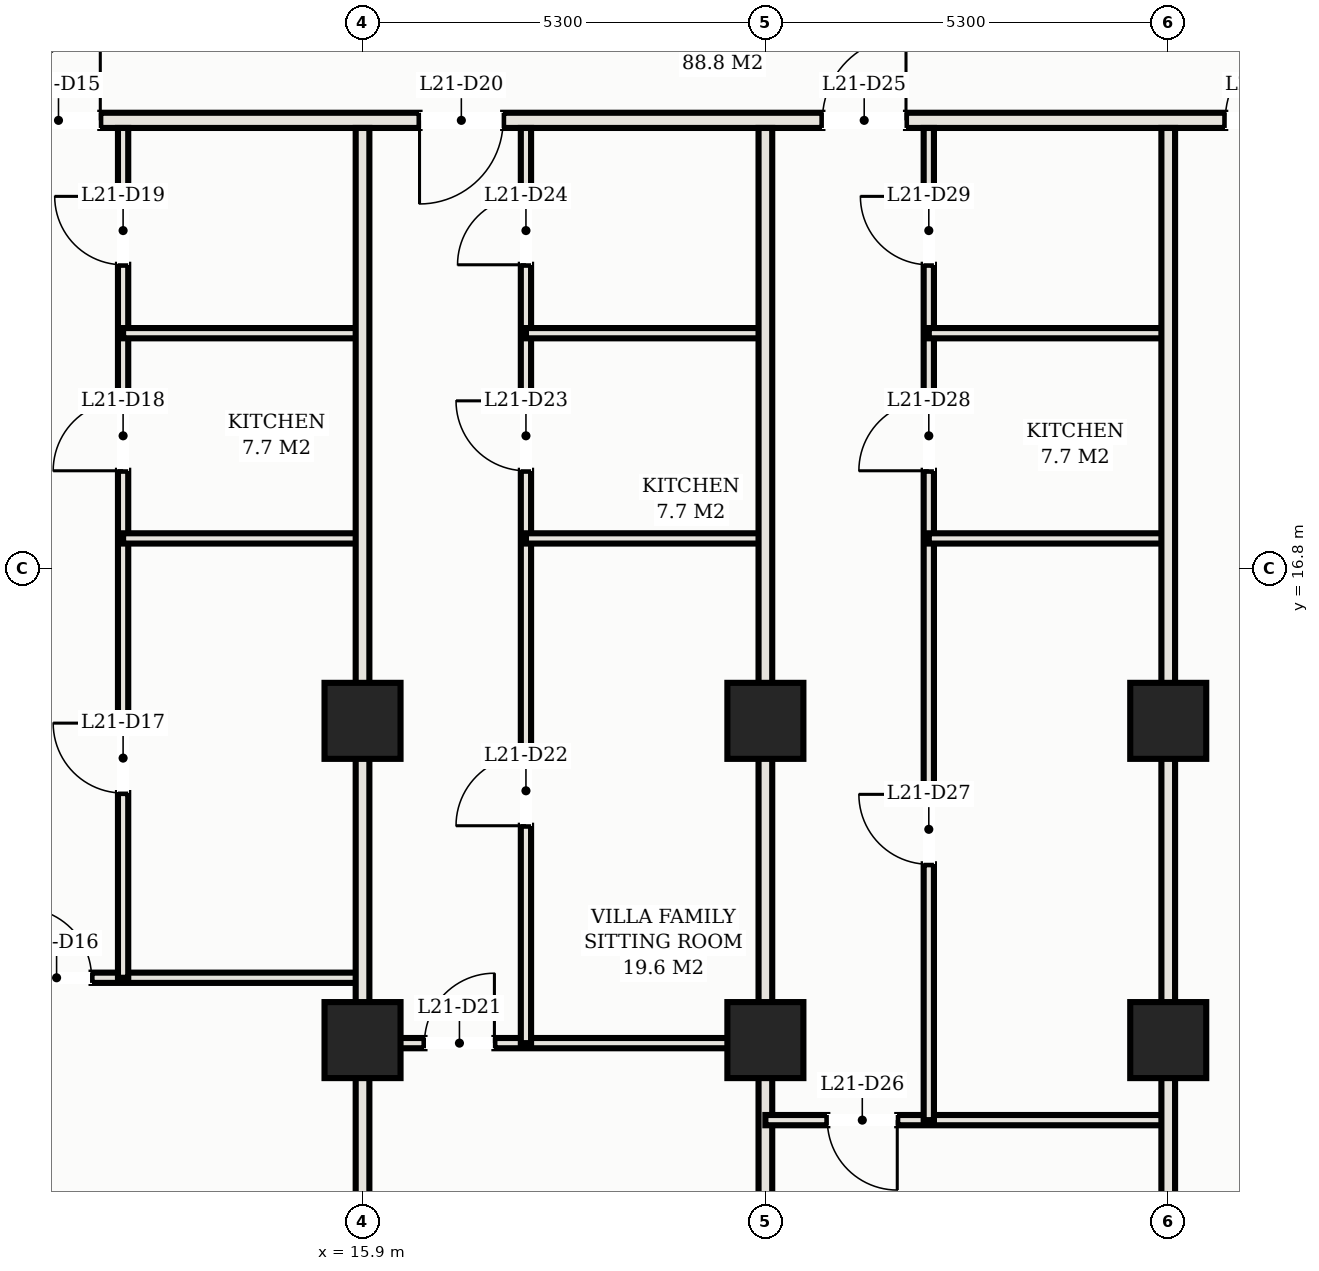
"""IFC4 building model, lengths in metres.
Left out: names, types, materials, properties, quantities, classifications, styles, units other than length and angle.
Written with IfcOpenShell. Run it as: python <this file> out.ifc"""

import sys

from ifc_helpers import new_model, si_unit, direction, frame, frame_2d, origin, origin_2d, place, context, subcontext, project, spatial, rectangle, hollow_rectangle, extrude, element, fill, save


model = new_model("IFC4")
c1 = context("Model", 3, precision=1e-05, world=origin(), true_north=direction((0.0, 1.0)))
c2 = subcontext(c1, "Body", "Model", "MODEL_VIEW")
j1 = project(units=[si_unit("LENGTHUNIT", "METRE"), si_unit("PLANEANGLEUNIT", "RADIAN")], contexts=[c1])
p1 = place(None, origin())
s1 = spatial("IfcSite", under=j1, at=p1, CompositionType="ELEMENT")
p2 = place(p1, origin())
s2 = spatial("IfcBuilding", under=s1, at=p2, CompositionType="ELEMENT")
p3 = place(p2, frame((0.0, 0.0, 81.7)))
s3 = spatial("IfcBuildingStorey", under=s2, at=p3, CompositionType="ELEMENT", Elevation=81.7)
for number, where, z_axis, x_axis in (
    (1, (15.9, 14.8, 0.0), (0.0, 0.0, 1.0), (1.0, 0.0, 0.0)),
    (2, (15.9, 10.6, 0.0), (0.0, 0.0, 1.0), (1.0, 0.0, 0.0)),
    (3, (21.2, 14.8, 0.0), (0.0, 0.0, 1.0), (1.0, 0.0, 0.0)),
    (4, (21.2, 10.6, 0.0), (0.0, 0.0, 1.0), (1.0, 0.0, 0.0)),
    (5, (26.5, 14.8, 0.0), (0.0, 0.0, 1.0), (1.0, 0.0, 0.0)),
    (6, (26.5, 10.6, 0.0), (0.0, 0.0, 1.0), (1.0, 0.0, 0.0)),
):
    element("IfcColumn", number, at=place(p3, frame(where, z_axis=z_axis, x_axis=x_axis)), inside=s3, PredefinedType="COLUMN", context=c2, shape_type="SweptSolid", body=[
        extrude(hollow_rectangle(XDim=1.0, YDim=1.0, WallThickness=0.036, at=origin_2d()), origin(), (0.0, 0.0, 1.0), 3.3),
    ])
p4 = place(p3, frame((1.62, 22.7, 0.0), z_axis=(0.0, 0.0, 1.0), x_axis=(1.0, 0.0, 0.0)))
e7 = element("IfcWall", 7, at=p4, inside=s3, PredefinedType="PARTITIONING", context=c2, shape_type="SweptSolid", body=[
    extrude(rectangle(XDim=49.76, YDim=0.2, at=frame_2d((24.88, 0.0))), origin(), (0.0, 0.0, 1.0), 2.38),
])
p5 = place(p4, frame((9.73, 0.0, 0.0)))
e8 = element("IfcOpeningElement", 8, at=p5, cuts=e7, PredefinedType="OPENING", context=c2, shape_type="SweptSolid", body=[
    extrude(rectangle(XDim=1.1, YDim=2.25, at=frame_2d((0.55, 1.125))), frame((0.0, 0.11, 0.0), z_axis=(0.0, -1.0, 0.0), x_axis=(1.0, 0.0, 0.0)), (0.0, 0.0, 1.0), 0.22),
])
p6 = place(p4, frame((15.03, 0.0, 0.0)))
e9 = element("IfcOpeningElement", 9, at=p6, cuts=e7, PredefinedType="OPENING", context=c2, shape_type="SweptSolid", body=[
    extrude(rectangle(XDim=1.1, YDim=2.25, at=frame_2d((0.55, 1.125))), frame((0.0, 0.11, 0.0), z_axis=(0.0, -1.0, 0.0), x_axis=(1.0, 0.0, 0.0)), (0.0, 0.0, 1.0), 0.22),
])
p7 = place(p4, frame((20.33, 0.0, 0.0)))
e10 = element("IfcOpeningElement", 10, at=p7, cuts=e7, PredefinedType="OPENING", context=c2, shape_type="SweptSolid", body=[
    extrude(rectangle(XDim=1.1, YDim=2.25, at=frame_2d((0.55, 1.125))), frame((0.0, 0.11, 0.0), z_axis=(0.0, -1.0, 0.0), x_axis=(1.0, 0.0, 0.0)), (0.0, 0.0, 1.0), 0.22),
])
p8 = place(p4, frame((25.63, 0.0, 0.0)))
e11 = element("IfcOpeningElement", 11, at=p8, cuts=e7, PredefinedType="OPENING", context=c2, shape_type="SweptSolid", body=[
    extrude(rectangle(XDim=1.1, YDim=2.25, at=frame_2d((0.55, 1.125))), frame((0.0, 0.11, 0.0), z_axis=(0.0, -1.0, 0.0), x_axis=(1.0, 0.0, 0.0)), (0.0, 0.0, 1.0), 0.22),
])
p9 = place(p4, frame((33.33, 0.0, 0.0)))
e12 = element("IfcOpeningElement", 12, at=p9, cuts=e7, PredefinedType="OPENING", context=c2, shape_type="SweptSolid", body=[
    extrude(rectangle(XDim=1.1, YDim=2.25, at=frame_2d((0.55, 1.125))), frame((0.0, 0.11, 0.0), z_axis=(0.0, -1.0, 0.0), x_axis=(1.0, 0.0, 0.0)), (0.0, 0.0, 1.0), 0.22),
])
p10 = place(p4, frame((3.985, 0.0, 0.0)))
e13 = element("IfcOpeningElement", 13, at=p10, cuts=e7, PredefinedType="OPENING", context=c2, shape_type="SweptSolid", body=[
    extrude(rectangle(XDim=0.92, YDim=2.15, at=frame_2d((0.46, 1.075))), frame((0.0, 0.11, 0.0), z_axis=(0.0, -1.0, 0.0), x_axis=(1.0, 0.0, 0.0)), (0.0, 0.0, 1.0), 0.22),
])
p11 = place(p4, frame((44.855, 0.0, 0.0)))
e14 = element("IfcOpeningElement", 14, at=p11, cuts=e7, PredefinedType="OPENING", context=c2, shape_type="SweptSolid", body=[
    extrude(rectangle(XDim=0.92, YDim=2.15, at=frame_2d((0.46, 1.075))), frame((0.0, 0.11, 0.0), z_axis=(0.0, -1.0, 0.0), x_axis=(1.0, 0.0, 0.0)), (0.0, 0.0, 1.0), 0.22),
])
p12 = place(p3, frame((10.6, 11.42, 0.0), z_axis=(0.0, 0.0, 1.0), x_axis=(1.0, 0.0, 0.0)))
e15 = element("IfcWall", 15, at=p12, inside=s3, PredefinedType="PARTITIONING", context=c2, shape_type="SweptSolid", body=[
    extrude(rectangle(XDim=5.3, YDim=0.135, at=frame_2d((2.65, 0.0))), origin(), (0.0, 0.0, 1.0), 2.38),
])
p13 = place(p12, frame((0.815, 0.0, 0.0)))
e16 = element("IfcOpeningElement", 16, at=p13, cuts=e15, PredefinedType="OPENING", context=c2, shape_type="SweptSolid", body=[
    extrude(rectangle(XDim=0.92, YDim=2.15, at=frame_2d((0.46, 1.075))), frame((0.0, 0.078, 0.0), z_axis=(0.0, -1.0, 0.0), x_axis=(1.0, 0.0, 0.0)), (0.0, 0.0, 1.0), 0.155),
])
p14 = place(p3, frame((12.75, 11.42, 0.0), z_axis=(0.0, 0.0, 1.0), x_axis=(0.0, 1.0, 0.0)))
e17 = element("IfcWall", 17, at=p14, inside=s3, PredefinedType="PARTITIONING", context=c2, shape_type="SweptSolid", body=[
    extrude(rectangle(XDim=11.18, YDim=0.135, at=frame_2d((5.59, 0.0))), origin(), (0.0, 0.0, 1.0), 2.38),
])
p15 = place(p14, frame((2.43, 0.0, 0.0)))
e18 = element("IfcOpeningElement", 18, at=p15, cuts=e17, PredefinedType="OPENING", context=c2, shape_type="SweptSolid", body=[
    extrude(rectangle(XDim=0.92, YDim=2.15, at=frame_2d((0.46, 1.075))), frame((0.0, 0.078, 0.0), z_axis=(0.0, -1.0, 0.0), x_axis=(1.0, 0.0, 0.0)), (0.0, 0.0, 1.0), 0.155),
])
p16 = place(p14, frame((6.67, 0.0, 0.0)))
e19 = element("IfcOpeningElement", 19, at=p16, cuts=e17, PredefinedType="OPENING", context=c2, shape_type="SweptSolid", body=[
    extrude(rectangle(XDim=0.92, YDim=2.15, at=frame_2d((0.46, 1.075))), frame((0.0, 0.078, 0.0), z_axis=(0.0, -1.0, 0.0), x_axis=(1.0, 0.0, 0.0)), (0.0, 0.0, 1.0), 0.155),
])
p17 = place(p14, frame((9.38, 0.0, 0.0)))
e20 = element("IfcOpeningElement", 20, at=p17, cuts=e17, PredefinedType="OPENING", context=c2, shape_type="SweptSolid", body=[
    extrude(rectangle(XDim=0.9, YDim=2.15, at=frame_2d((0.45, 1.075))), frame((0.0, 0.078, 0.0), z_axis=(0.0, -1.0, 0.0), x_axis=(1.0, 0.0, 0.0)), (0.0, 0.0, 1.0), 0.155),
])
for number, where, z_axis, x_axis in (
    (21, (12.75, 17.2, 0.0), (0.0, 0.0, 1.0), (1.0, 0.0, 0.0)),
    (22, (12.75, 19.9, 0.0), (0.0, 0.0, 1.0), (1.0, 0.0, 0.0)),
):
    element("IfcWall", number, at=place(p3, frame(where, z_axis=z_axis, x_axis=x_axis)), inside=s3, PredefinedType="PARTITIONING", context=c2, shape_type="SweptSolid", body=[
        extrude(rectangle(XDim=3.15, YDim=0.135, at=frame_2d((1.575, 0.0))), origin(), (0.0, 0.0, 1.0), 2.38),
    ])
p18 = place(p3, frame((15.9, 1.62, 0.0), z_axis=(0.0, 0.0, 1.0), x_axis=(0.0, 1.0, 0.0)))
e23 = element("IfcWall", 23, at=p18, inside=s3, PredefinedType="PARTITIONING", context=c2, shape_type="SweptSolid", body=[
    extrude(rectangle(XDim=20.98, YDim=0.18, at=frame_2d((10.49, 0.0))), origin(), (0.0, 0.0, 1.0), 2.335),
])
p19 = place(p3, frame((15.9, 10.56, 0.0), z_axis=(0.0, 0.0, 1.0), x_axis=(1.0, 0.0, 0.0)))
e24 = element("IfcWall", 24, at=p19, inside=s3, PredefinedType="PARTITIONING", context=c2, shape_type="SweptSolid", body=[
    extrude(rectangle(XDim=5.3, YDim=0.135, at=frame_2d((2.65, 0.0))), origin(), (0.0, 0.0, 1.0), 2.335),
])
p20 = place(p19, frame((0.815, 0.0, 0.0)))
e25 = element("IfcOpeningElement", 25, at=p20, cuts=e24, PredefinedType="OPENING", context=c2, shape_type="SweptSolid", body=[
    extrude(rectangle(XDim=0.92, YDim=2.15, at=frame_2d((0.46, 1.075))), frame((0.0, 0.078, 0.0), z_axis=(0.0, -1.0, 0.0), x_axis=(1.0, 0.0, 0.0)), (0.0, 0.0, 1.0), 0.155),
])
p21 = place(p3, frame((18.05, 10.56, 0.0), z_axis=(0.0, 0.0, 1.0), x_axis=(0.0, 1.0, 0.0)))
e26 = element("IfcWall", 26, at=p21, inside=s3, PredefinedType="PARTITIONING", context=c2, shape_type="SweptSolid", body=[
    extrude(rectangle(XDim=12.04, YDim=0.135, at=frame_2d((6.02, 0.0))), origin(), (0.0, 0.0, 1.0), 2.38),
])
p22 = place(p21, frame((2.86, 0.0, 0.0)))
e27 = element("IfcOpeningElement", 27, at=p22, cuts=e26, PredefinedType="OPENING", context=c2, shape_type="SweptSolid", body=[
    extrude(rectangle(XDim=0.92, YDim=2.15, at=frame_2d((0.46, 1.075))), frame((0.0, 0.078, 0.0), z_axis=(0.0, -1.0, 0.0), x_axis=(1.0, 0.0, 0.0)), (0.0, 0.0, 1.0), 0.155),
])
p23 = place(p21, frame((7.53, 0.0, 0.0)))
e28 = element("IfcOpeningElement", 28, at=p23, cuts=e26, PredefinedType="OPENING", context=c2, shape_type="SweptSolid", body=[
    extrude(rectangle(XDim=0.92, YDim=2.15, at=frame_2d((0.46, 1.075))), frame((0.0, 0.078, 0.0), z_axis=(0.0, -1.0, 0.0), x_axis=(1.0, 0.0, 0.0)), (0.0, 0.0, 1.0), 0.155),
])
p24 = place(p21, frame((10.24, 0.0, 0.0)))
e29 = element("IfcOpeningElement", 29, at=p24, cuts=e26, PredefinedType="OPENING", context=c2, shape_type="SweptSolid", body=[
    extrude(rectangle(XDim=0.9, YDim=2.15, at=frame_2d((0.45, 1.075))), frame((0.0, 0.078, 0.0), z_axis=(0.0, -1.0, 0.0), x_axis=(1.0, 0.0, 0.0)), (0.0, 0.0, 1.0), 0.155),
])
for number, where, z_axis, x_axis in (
    (30, (18.05, 17.2, 0.0), (0.0, 0.0, 1.0), (1.0, 0.0, 0.0)),
    (31, (18.05, 19.9, 0.0), (0.0, 0.0, 1.0), (1.0, 0.0, 0.0)),
):
    element("IfcWall", number, at=place(p3, frame(where, z_axis=z_axis, x_axis=x_axis)), inside=s3, PredefinedType="PARTITIONING", context=c2, shape_type="SweptSolid", body=[
        extrude(rectangle(XDim=3.15, YDim=0.135, at=frame_2d((1.575, 0.0))), origin(), (0.0, 0.0, 1.0), 2.38),
    ])
p25 = place(p3, frame((21.2, 0.127, 0.0), z_axis=(0.0, 0.0, 1.0), x_axis=(0.0, 1.0, 0.0)))
e32 = element("IfcWall", 32, at=p25, inside=s3, PredefinedType="PARTITIONING", context=c2, shape_type="SweptSolid", body=[
    extrude(rectangle(XDim=22.473, YDim=0.18, at=frame_2d((11.237, 0.0))), origin(), (0.0, 0.0, 1.0), 2.335),
])
p26 = place(p3, frame((21.2, 9.547, 0.0), z_axis=(0.0, 0.0, 1.0), x_axis=(1.0, 0.0, 0.0)))
e33 = element("IfcWall", 33, at=p26, inside=s3, PredefinedType="PARTITIONING", context=c2, shape_type="SweptSolid", body=[
    extrude(rectangle(XDim=5.3, YDim=0.135, at=frame_2d((2.65, 0.0))), origin(), (0.0, 0.0, 1.0), 2.38),
])
p27 = place(p26, frame((0.815, 0.0, 0.0)))
e34 = element("IfcOpeningElement", 34, at=p27, cuts=e33, PredefinedType="OPENING", context=c2, shape_type="SweptSolid", body=[
    extrude(rectangle(XDim=0.92, YDim=2.15, at=frame_2d((0.46, 1.075))), frame((0.0, 0.078, 0.0), z_axis=(0.0, -1.0, 0.0), x_axis=(1.0, 0.0, 0.0)), (0.0, 0.0, 1.0), 0.155),
])
p28 = place(p3, frame((23.35, 9.547, 0.0), z_axis=(0.0, 0.0, 1.0), x_axis=(0.0, 1.0, 0.0)))
e35 = element("IfcWall", 35, at=p28, inside=s3, PredefinedType="PARTITIONING", context=c2, shape_type="SweptSolid", body=[
    extrude(rectangle(XDim=13.053, YDim=0.135, at=frame_2d((6.526, 0.0))), origin(), (0.0, 0.0, 1.0), 2.38),
])
p29 = place(p28, frame((3.366, 0.0, 0.0)))
e36 = element("IfcOpeningElement", 36, at=p29, cuts=e35, PredefinedType="OPENING", context=c2, shape_type="SweptSolid", body=[
    extrude(rectangle(XDim=0.92, YDim=2.15, at=frame_2d((0.46, 1.075))), frame((0.0, 0.078, 0.0), z_axis=(0.0, -1.0, 0.0), x_axis=(1.0, 0.0, 0.0)), (0.0, 0.0, 1.0), 0.155),
])
p30 = place(p28, frame((8.543, 0.0, 0.0)))
e37 = element("IfcOpeningElement", 37, at=p30, cuts=e35, PredefinedType="OPENING", context=c2, shape_type="SweptSolid", body=[
    extrude(rectangle(XDim=0.92, YDim=2.15, at=frame_2d((0.46, 1.075))), frame((0.0, 0.078, 0.0), z_axis=(0.0, -1.0, 0.0), x_axis=(1.0, 0.0, 0.0)), (0.0, 0.0, 1.0), 0.155),
])
p31 = place(p28, frame((11.253, 0.0, 0.0)))
e38 = element("IfcOpeningElement", 38, at=p31, cuts=e35, PredefinedType="OPENING", context=c2, shape_type="SweptSolid", body=[
    extrude(rectangle(XDim=0.9, YDim=2.15, at=frame_2d((0.45, 1.075))), frame((0.0, 0.078, 0.0), z_axis=(0.0, -1.0, 0.0), x_axis=(1.0, 0.0, 0.0)), (0.0, 0.0, 1.0), 0.155),
])
for number, where, z_axis, x_axis in (
    (39, (23.35, 17.2, 0.0), (0.0, 0.0, 1.0), (1.0, 0.0, 0.0)),
    (40, (23.35, 19.9, 0.0), (0.0, 0.0, 1.0), (1.0, 0.0, 0.0)),
):
    element("IfcWall", number, at=place(p3, frame(where, z_axis=z_axis, x_axis=x_axis)), inside=s3, PredefinedType="PARTITIONING", context=c2, shape_type="SweptSolid", body=[
        extrude(rectangle(XDim=3.15, YDim=0.135, at=frame_2d((1.575, 0.0))), origin(), (0.0, 0.0, 1.0), 2.38),
    ])
p32 = place(p3, frame((26.5, -0.38, 0.0), z_axis=(0.0, 0.0, 1.0), x_axis=(0.0, 1.0, 0.0)))
e41 = element("IfcWall", 41, at=p32, inside=s3, PredefinedType="PARTITIONING", context=c2, shape_type="SweptSolid", body=[
    extrude(rectangle(XDim=22.98, YDim=0.18, at=frame_2d((11.49, 0.0))), origin(), (0.0, 0.0, 1.0), 2.335),
])
p33 = place(p5, origin())
e42 = element("IfcDoor", 42, at=p33, inside=s3, OperationType="SINGLE_SWING_RIGHT", PredefinedType="DOOR", context=c2, shape_type="SweptSolid", body=[
    extrude(rectangle(XDim=1.1, YDim=2.25, at=frame_2d((0.55, 1.125))), frame((0.0, 0.025, 0.0), z_axis=(0.0, -1.0, 0.0), x_axis=(1.0, 0.0, 0.0)), (0.0, 0.0, 1.0), 0.05),
])
fill(e8, e42)
p34 = place(p13, origin())
e43 = element("IfcDoor", 43, at=p34, inside=s3, OperationType="SINGLE_SWING_LEFT", PredefinedType="DOOR", context=c2, shape_type="SweptSolid", body=[
    extrude(rectangle(XDim=0.92, YDim=2.15, at=frame_2d((0.46, 1.075))), frame((0.0, 0.025, 0.0), z_axis=(0.0, -1.0, 0.0), x_axis=(1.0, 0.0, 0.0)), (0.0, 0.0, 1.0), 0.05),
])
fill(e16, e43)
p35 = place(p15, origin())
e44 = element("IfcDoor", 44, at=p35, inside=s3, OperationType="SINGLE_SWING_RIGHT", PredefinedType="DOOR", context=c2, shape_type="SweptSolid", body=[
    extrude(rectangle(XDim=0.92, YDim=2.15, at=frame_2d((0.46, 1.075))), frame((0.0, 0.025, 0.0), z_axis=(0.0, -1.0, 0.0), x_axis=(1.0, 0.0, 0.0)), (0.0, 0.0, 1.0), 0.05),
])
fill(e18, e44)
p36 = place(p16, origin())
e45 = element("IfcDoor", 45, at=p36, inside=s3, OperationType="SINGLE_SWING_LEFT", PredefinedType="DOOR", context=c2, shape_type="SweptSolid", body=[
    extrude(rectangle(XDim=0.92, YDim=2.15, at=frame_2d((0.46, 1.075))), frame((0.0, 0.025, 0.0), z_axis=(0.0, -1.0, 0.0), x_axis=(1.0, 0.0, 0.0)), (0.0, 0.0, 1.0), 0.05),
])
fill(e19, e45)
p37 = place(p17, origin())
e46 = element("IfcDoor", 46, at=p37, inside=s3, OperationType="SINGLE_SWING_RIGHT", PredefinedType="DOOR", context=c2, shape_type="SweptSolid", body=[
    extrude(rectangle(XDim=0.9, YDim=2.15, at=frame_2d((0.45, 1.075))), frame((0.0, 0.025, 0.0), z_axis=(0.0, -1.0, 0.0), x_axis=(1.0, 0.0, 0.0)), (0.0, 0.0, 1.0), 0.05),
])
fill(e20, e46)
p38 = place(p6, frame((1.1, 0.0, 0.0), z_axis=(0.0, 0.0, 1.0), x_axis=(-1.0, 0.0, 0.0)))
e47 = element("IfcDoor", 47, at=p38, inside=s3, OperationType="SINGLE_SWING_RIGHT", PredefinedType="DOOR", context=c2, shape_type="SweptSolid", body=[
    extrude(rectangle(XDim=1.1, YDim=2.25, at=frame_2d((0.55, 1.125))), frame((0.0, 0.025, 0.0), z_axis=(0.0, -1.0, 0.0), x_axis=(1.0, 0.0, 0.0)), (0.0, 0.0, 1.0), 0.05),
])
fill(e9, e47)
p39 = place(p20, origin())
e48 = element("IfcDoor", 48, at=p39, inside=s3, OperationType="SINGLE_SWING_RIGHT", PredefinedType="DOOR", context=c2, shape_type="SweptSolid", body=[
    extrude(rectangle(XDim=0.92, YDim=2.15, at=frame_2d((0.46, 1.075))), frame((0.0, 0.025, 0.0), z_axis=(0.0, -1.0, 0.0), x_axis=(1.0, 0.0, 0.0)), (0.0, 0.0, 1.0), 0.05),
])
fill(e25, e48)
p40 = place(p22, origin())
e49 = element("IfcDoor", 49, at=p40, inside=s3, OperationType="SINGLE_SWING_LEFT", PredefinedType="DOOR", context=c2, shape_type="SweptSolid", body=[
    extrude(rectangle(XDim=0.92, YDim=2.15, at=frame_2d((0.46, 1.075))), frame((0.0, 0.025, 0.0), z_axis=(0.0, -1.0, 0.0), x_axis=(1.0, 0.0, 0.0)), (0.0, 0.0, 1.0), 0.05),
])
fill(e27, e49)
p41 = place(p23, origin())
e50 = element("IfcDoor", 50, at=p41, inside=s3, OperationType="SINGLE_SWING_RIGHT", PredefinedType="DOOR", context=c2, shape_type="SweptSolid", body=[
    extrude(rectangle(XDim=0.92, YDim=2.15, at=frame_2d((0.46, 1.075))), frame((0.0, 0.025, 0.0), z_axis=(0.0, -1.0, 0.0), x_axis=(1.0, 0.0, 0.0)), (0.0, 0.0, 1.0), 0.05),
])
fill(e28, e50)
p42 = place(p24, origin())
e51 = element("IfcDoor", 51, at=p42, inside=s3, OperationType="SINGLE_SWING_LEFT", PredefinedType="DOOR", context=c2, shape_type="SweptSolid", body=[
    extrude(rectangle(XDim=0.9, YDim=2.15, at=frame_2d((0.45, 1.075))), frame((0.0, 0.025, 0.0), z_axis=(0.0, -1.0, 0.0), x_axis=(1.0, 0.0, 0.0)), (0.0, 0.0, 1.0), 0.05),
])
fill(e29, e51)
p43 = place(p7, origin())
e52 = element("IfcDoor", 52, at=p43, inside=s3, OperationType="SINGLE_SWING_RIGHT", PredefinedType="DOOR", context=c2, shape_type="SweptSolid", body=[
    extrude(rectangle(XDim=1.1, YDim=2.25, at=frame_2d((0.55, 1.125))), frame((0.0, 0.025, 0.0), z_axis=(0.0, -1.0, 0.0), x_axis=(1.0, 0.0, 0.0)), (0.0, 0.0, 1.0), 0.05),
])
fill(e10, e52)
p44 = place(p27, frame((0.92, 0.0, 0.0), z_axis=(0.0, 0.0, 1.0), x_axis=(-1.0, 0.0, 0.0)))
e53 = element("IfcDoor", 53, at=p44, inside=s3, OperationType="SINGLE_SWING_LEFT", PredefinedType="DOOR", context=c2, shape_type="SweptSolid", body=[
    extrude(rectangle(XDim=0.92, YDim=2.15, at=frame_2d((0.46, 1.075))), frame((0.0, 0.025, 0.0), z_axis=(0.0, -1.0, 0.0), x_axis=(1.0, 0.0, 0.0)), (0.0, 0.0, 1.0), 0.05),
])
fill(e34, e53)
p45 = place(p29, origin())
e54 = element("IfcDoor", 54, at=p45, inside=s3, OperationType="SINGLE_SWING_RIGHT", PredefinedType="DOOR", context=c2, shape_type="SweptSolid", body=[
    extrude(rectangle(XDim=0.92, YDim=2.15, at=frame_2d((0.46, 1.075))), frame((0.0, 0.025, 0.0), z_axis=(0.0, -1.0, 0.0), x_axis=(1.0, 0.0, 0.0)), (0.0, 0.0, 1.0), 0.05),
])
fill(e36, e54)
p46 = place(p30, origin())
e55 = element("IfcDoor", 55, at=p46, inside=s3, OperationType="SINGLE_SWING_LEFT", PredefinedType="DOOR", context=c2, shape_type="SweptSolid", body=[
    extrude(rectangle(XDim=0.92, YDim=2.15, at=frame_2d((0.46, 1.075))), frame((0.0, 0.025, 0.0), z_axis=(0.0, -1.0, 0.0), x_axis=(1.0, 0.0, 0.0)), (0.0, 0.0, 1.0), 0.05),
])
fill(e37, e55)
p47 = place(p31, origin())
e56 = element("IfcDoor", 56, at=p47, inside=s3, OperationType="SINGLE_SWING_RIGHT", PredefinedType="DOOR", context=c2, shape_type="SweptSolid", body=[
    extrude(rectangle(XDim=0.9, YDim=2.15, at=frame_2d((0.45, 1.075))), frame((0.0, 0.025, 0.0), z_axis=(0.0, -1.0, 0.0), x_axis=(1.0, 0.0, 0.0)), (0.0, 0.0, 1.0), 0.05),
])
fill(e38, e56)
p48 = place(p8, origin())
e57 = element("IfcDoor", 57, at=p48, inside=s3, OperationType="SINGLE_SWING_RIGHT", PredefinedType="DOOR", context=c2, shape_type="SweptSolid", body=[
    extrude(rectangle(XDim=1.1, YDim=2.25, at=frame_2d((0.55, 1.125))), frame((0.0, 0.025, 0.0), z_axis=(0.0, -1.0, 0.0), x_axis=(1.0, 0.0, 0.0)), (0.0, 0.0, 1.0), 0.05),
])
fill(e11, e57)
save(model, sys.argv[1])
